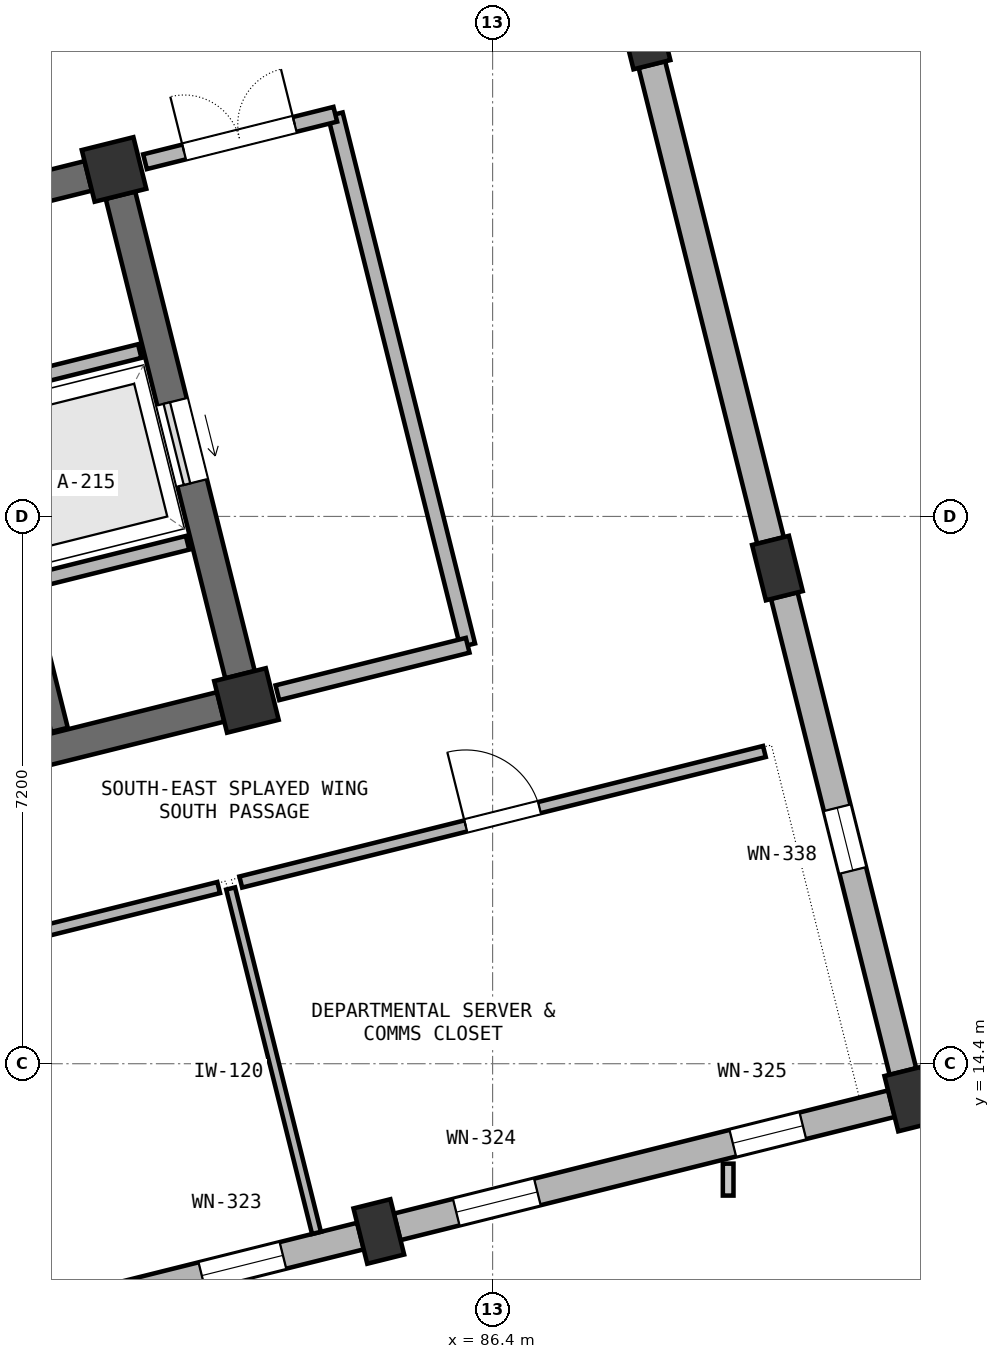
"""IFC4 building model, lengths in metres.
Left out: names, types, materials, properties, quantities, classifications, styles, units other than length and angle.
Written with IfcOpenShell. Run it as: python <this file> out.ifc"""

import sys

from ifc_helpers import new_model, si_unit, direction, frame, frame_2d, origin, origin_2d, place, context, subcontext, project, spatial, rectangle, extrude, element, fill, save


model = new_model("IFC4")
c1 = context("Model", 3, precision=1e-05, world=origin(), true_north=direction((0.0, 1.0)))
c2 = subcontext(c1, "Body", "Model", "MODEL_VIEW")
j1 = project(units=[si_unit("LENGTHUNIT", "METRE"), si_unit("PLANEANGLEUNIT", "RADIAN")], contexts=[c1])
p1 = place(None, origin())
s1 = spatial("IfcSite", under=j1, at=p1, CompositionType="ELEMENT")
p2 = place(p1, origin())
s2 = spatial("IfcBuilding", under=s1, at=p2, CompositionType="ELEMENT")
p3 = place(p2, frame((0.0, 0.0, 14.4)))
s3 = spatial("IfcBuildingStorey", under=s2, at=p3, CompositionType="ELEMENT", Elevation=14.4)
p4 = place(p3, frame((84.903, 12.193, 0.0), z_axis=(0.0, 0.0, 1.0), x_axis=(0.970295726276, 0.2419218956, 0.0)))
e1 = element("IfcColumn", 1, at=p4, inside=s3, PredefinedType="COLUMN", context=c2, shape_type="SweptSolid", body=[
    extrude(rectangle(XDim=0.5, YDim=0.75, at=origin_2d()), origin(), (0.0, 0.0, 1.0), 4.2),
])
for number, where, z_axis, x_axis in (
    (2, (83.161, 19.179, 0.0), (0.0, 0.0, 1.0), (0.97, 0.242, 0.0)),
    (3, (81.419, 26.165, 0.0), (0.0, 0.0, 1.0), (0.97, 0.242, 0.0)),
):
    element("IfcColumn", number, at=place(p3, frame(where, z_axis=z_axis, x_axis=x_axis)), inside=s3, PredefinedType="COLUMN", context=c2, shape_type="SweptSolid", body=[
        extrude(rectangle(XDim=0.7, YDim=0.7, at=origin_2d()), origin(), (0.0, 0.0, 1.0), 4.2),
    ])
for number, where, z_axis, x_axis in (
    (4, (91.889, 13.935, 0.0), (0.0, 0.0, 1.0), (0.97, 0.242, 0.0)),
    (5, (90.147, 20.921, 0.0), (0.0, 0.0, 1.0), (0.97, 0.242, 0.0)),
    (6, (88.405, 27.907, 0.0), (0.0, 0.0, 1.0), (0.97, 0.242, 0.0)),
):
    element("IfcColumn", number, at=place(p3, frame(where, z_axis=z_axis, x_axis=x_axis)), inside=s3, PredefinedType="COLUMN", context=c2, shape_type="SweptSolid", body=[
        extrude(rectangle(XDim=0.5, YDim=0.75, at=origin_2d()), origin(), (0.0, 0.0, 1.0), 4.2),
    ])
p5 = place(p3, frame((76.515, 17.522, 0.0), z_axis=(0.0, 0.0, 1.0), x_axis=(0.970294759049, 0.241925774902, 0.0)))
e7 = element("IfcWall", 7, at=p5, inside=s3, PredefinedType="SHEAR", context=c2, shape_type="SweptSolid", body=[
    extrude(rectangle(XDim=6.5, YDim=0.4, at=frame_2d((3.25, 0.0))), origin(), (0.0, 0.0, 1.0), 4.2),
])
p6 = place(p3, frame((83.076, 19.519, 0.0), z_axis=(0.0, 0.0, 1.0), x_axis=(-0.241925774902, 0.970294759049, 0.0)))
e8 = element("IfcWall", 8, at=p6, inside=s3, PredefinedType="SHEAR", context=c2, shape_type="SweptSolid", body=[
    extrude(rectangle(XDim=6.5, YDim=0.4, at=frame_2d((3.25, 0.0))), origin(), (0.0, 0.0, 1.0), 4.2),
])
p7 = place(p6, frame((2.6, 0.0, 0.0)))
e9 = element("IfcOpeningElement", 9, at=p7, cuts=e8, PredefinedType="OPENING", context=c2, shape_type="SweptSolid", body=[
    extrude(rectangle(XDim=1.1, YDim=2.2, at=frame_2d((0.55, 1.1))), frame((0.0, 0.21, 0.0), z_axis=(0.0, -1.0, 0.0), x_axis=(1.0, 0.0, 0.0)), (0.0, 0.0, 1.0), 0.42),
])
p8 = place(p3, frame((81.08, 26.081, 0.0), z_axis=(0.0, 0.0, 1.0), x_axis=(-0.970294759049, -0.241925774902, 0.0)))
e10 = element("IfcWall", 10, at=p8, inside=s3, PredefinedType="SHEAR", context=c2, shape_type="SweptSolid", body=[
    extrude(rectangle(XDim=6.5, YDim=0.4, at=frame_2d((3.25, 0.0))), origin(), (0.0, 0.0, 1.0), 4.2),
])
p9 = place(p8, frame((3.6, 0.0, 0.0)))
e11 = element("IfcOpeningElement", 11, at=p9, cuts=e10, PredefinedType="OPENING", context=c2, shape_type="SweptSolid", body=[
    extrude(rectangle(XDim=1.2, YDim=2.2, at=frame_2d((0.6, 1.1))), frame((0.0, 0.21, 0.0), z_axis=(0.0, -1.0, 0.0), x_axis=(1.0, 0.0, 0.0)), (0.0, 0.0, 1.0), 0.42),
])
p10 = place(p3, frame((80.701, 18.792, 0.0), z_axis=(0.0, 0.0, 1.0), x_axis=(-0.241898249226, 0.970301621673, 0.0)))
e12 = element("IfcWall", 12, at=p10, inside=s3, PredefinedType="SHEAR", context=c2, shape_type="SweptSolid", body=[
    extrude(rectangle(XDim=6.76, YDim=0.225, at=frame_2d((3.38, 0.0))), origin(), (0.0, 0.0, 1.0), 4.2),
])
for number, where, z_axis, x_axis in (
    (13, (80.349, 20.745, 0.0), (0.0, 0.0, 1.0), (0.97, 0.242, 0.0)),
    (14, (79.72, 23.268, 0.0), (0.0, 0.0, 1.0), (0.97, 0.242, 0.0)),
):
    element("IfcWall", number, at=place(p3, frame(where, z_axis=z_axis, x_axis=x_axis)), inside=s3, PredefinedType="PARTITIONING", context=c2, shape_type="SweptSolid", body=[
        extrude(rectangle(XDim=2.1, YDim=0.185, at=frame_2d((1.05, 0.0))), origin(), (0.0, 0.0, 1.0), 4.2),
    ])
p11 = place(p3, frame((78.157, 10.511, 0.0), z_axis=(0.0, 0.0, 1.0), x_axis=(0.970296540998, 0.241918627903, 0.0)))
e15 = element("IfcWall", 15, at=p11, inside=s3, PredefinedType="SOLIDWALL", context=c2, shape_type="SweptSolid", body=[
    extrude(rectangle(XDim=6.704, YDim=0.36, at=frame_2d((3.352, 0.0))), origin(), (0.0, 0.0, 1.0), 3.04),
])
p12 = place(p11, frame((0.802, 0.0, 0.7)))
e16 = element("IfcOpeningElement", 16, at=p12, cuts=e15, PredefinedType="OPENING", context=c2, shape_type="SweptSolid", body=[
    extrude(rectangle(XDim=0.95, YDim=2.15, at=frame_2d((0.475, 1.075))), frame((0.0, 0.19, 0.0), z_axis=(0.0, -1.0, 0.0), x_axis=(1.0, 0.0, 0.0)), (0.0, 0.0, 1.0), 0.38),
])
p13 = place(p11, frame((4.552, 0.0, 0.7)))
e17 = element("IfcOpeningElement", 17, at=p13, cuts=e15, PredefinedType="OPENING", context=c2, shape_type="SweptSolid", body=[
    extrude(rectangle(XDim=1.1, YDim=2.19, at=frame_2d((0.55, 1.095))), frame((0.0, 0.19, 0.0), z_axis=(0.0, -1.0, 0.0), x_axis=(1.0, 0.0, 0.0)), (0.0, 0.0, 1.0), 0.38),
])
p14 = place(p3, frame((85.144, 12.253, 0.0), z_axis=(0.0, 0.0, 1.0), x_axis=(0.970296540998, 0.241918627903, 0.0)))
e18 = element("IfcWall", 18, at=p14, inside=s3, PredefinedType="SOLIDWALL", context=c2, shape_type="SweptSolid", body=[
    extrude(rectangle(XDim=6.704, YDim=0.36, at=frame_2d((3.352, 0.0))), origin(), (0.0, 0.0, 1.0), 3.04),
])
p15 = place(p14, frame((0.802, 0.0, 0.7)))
e19 = element("IfcOpeningElement", 19, at=p15, cuts=e18, PredefinedType="OPENING", context=c2, shape_type="SweptSolid", body=[
    extrude(rectangle(XDim=1.1, YDim=2.19, at=frame_2d((0.55, 1.095))), frame((0.0, 0.19, 0.0), z_axis=(0.0, -1.0, 0.0), x_axis=(1.0, 0.0, 0.0)), (0.0, 0.0, 1.0), 0.38),
])
p16 = place(p14, frame((4.552, 0.0, 0.7)))
e20 = element("IfcOpeningElement", 20, at=p16, cuts=e18, PredefinedType="OPENING", context=c2, shape_type="SweptSolid", body=[
    extrude(rectangle(XDim=0.95, YDim=2.15, at=frame_2d((0.475, 1.075))), frame((0.0, 0.19, 0.0), z_axis=(0.0, -1.0, 0.0), x_axis=(1.0, 0.0, 0.0)), (0.0, 0.0, 1.0), 0.38),
])
p17 = place(p3, frame((91.799, 14.297, 0.0), z_axis=(0.0, 0.0, 1.0), x_axis=(-0.241912519272, 0.970298064009, 0.0)))
e21 = element("IfcWall", 21, at=p17, inside=s3, PredefinedType="SOLIDWALL", context=c2, shape_type="SweptSolid", body=[
    extrude(rectangle(XDim=6.454, YDim=0.36, at=frame_2d((3.227, 0.0))), origin(), (0.0, 0.0, 1.0), 3.04),
])
p18 = place(p17, frame((2.727, 0.0, 0.7)))
e22 = element("IfcOpeningElement", 22, at=p18, cuts=e21, PredefinedType="OPENING", context=c2, shape_type="SweptSolid", body=[
    extrude(rectangle(XDim=0.85, YDim=2.19, at=frame_2d((0.425, 1.095))), frame((0.0, 0.19, 0.0), z_axis=(0.0, -1.0, 0.0), x_axis=(1.0, 0.0, 0.0)), (0.0, 0.0, 1.0), 0.38),
])
p19 = place(p3, frame((90.057, 21.283, 0.0), z_axis=(0.0, 0.0, 1.0), x_axis=(-0.241912519272, 0.970298064009, 0.0)))
e23 = element("IfcWall", 23, at=p19, inside=s3, PredefinedType="SOLIDWALL", context=c2, shape_type="SweptSolid", body=[
    extrude(rectangle(XDim=6.454, YDim=0.36, at=frame_2d((3.227, 0.0))), origin(), (0.0, 0.0, 1.0), 3.04),
])
p20 = place(p3, frame((86.072, 19.905, 0.0), z_axis=(0.0, 0.0, 1.0), x_axis=(-0.241937193493, 0.970291911955, 0.0)))
e24 = element("IfcWall", 24, at=p20, inside=s3, PredefinedType="PARTITIONING", context=c2, shape_type="SweptSolid", body=[
    extrude(rectangle(XDim=7.2, YDim=0.2, at=frame_2d((3.6, 0.0))), origin(), (0.0, 0.0, 1.0), 3.08),
])
p21 = place(p3, frame((83.569, 19.281, 0.0), z_axis=(0.0, 0.0, 1.0), x_axis=(0.970287048366, 0.241956698135, 0.0)))
e25 = element("IfcWall", 25, at=p21, inside=s3, PredefinedType="PARTITIONING", context=c2, shape_type="SweptSolid", body=[
    extrude(rectangle(XDim=2.58, YDim=0.2, at=frame_2d((1.29, 0.0))), origin(), (0.0, 0.0, 1.0), 3.08),
])
p22 = place(p3, frame((84.33, 26.891, 0.0), z_axis=(0.0, 0.0, 1.0), x_axis=(-0.970309259708, -0.2418676095, 0.0)))
e26 = element("IfcWall", 26, at=p22, inside=s3, PredefinedType="PARTITIONING", context=c2, shape_type="SweptSolid", body=[
    extrude(rectangle(XDim=2.58, YDim=0.2, at=frame_2d((1.29, 0.0))), origin(), (0.0, 0.0, 1.0), 3.08),
])
p23 = place(p22, frame((0.55, 0.0, 0.0)))
e27 = element("IfcOpeningElement", 27, at=p23, cuts=e26, PredefinedType="OPENING", context=c2, shape_type="SweptSolid", body=[
    extrude(rectangle(XDim=1.5, YDim=2.2, at=frame_2d((0.75, 1.1))), frame((0.0, 0.11, 0.0), z_axis=(0.0, -1.0, 0.0), x_axis=(1.0, 0.0, 0.0)), (0.0, 0.0, 1.0), 0.22),
])
p24 = place(p3, frame((67.562, 12.919, 0.0), z_axis=(0.0, 0.0, 1.0), x_axis=(0.970296892124, 0.24191721959, 0.0)))
e28 = element("IfcWall", 28, at=p24, inside=s3, PredefinedType="PARTITIONING", context=c2, shape_type="SweptSolid", body=[
    extrude(rectangle(XDim=15.7, YDim=0.15, at=frame_2d((7.85, 0.0))), origin(), (0.0, 0.0, 1.0), 3.08),
])
p25 = place(p24, frame((7.35, 0.0, 0.0)))
e29 = element("IfcOpeningElement", 29, at=p25, cuts=e28, PredefinedType="OPENING", context=c2, shape_type="SweptSolid", body=[
    extrude(rectangle(XDim=1.0, YDim=2.2, at=frame_2d((0.5, 1.1))), frame((0.0, 0.085, 0.0), z_axis=(0.0, -1.0, 0.0), x_axis=(1.0, 0.0, 0.0)), (0.0, 0.0, 1.0), 0.17),
])
p26 = place(p3, frame((83.087, 16.79, 0.0), z_axis=(0.0, 0.0, 1.0), x_axis=(0.970289980954, 0.241944937661, 0.0)))
e30 = element("IfcWall", 30, at=p26, inside=s3, PredefinedType="PARTITIONING", context=c2, shape_type="SweptSolid", body=[
    extrude(rectangle(XDim=7.1, YDim=0.15, at=frame_2d((3.55, 0.0))), origin(), (0.0, 0.0, 1.0), 3.08),
])
p27 = place(p26, frame((3.05, 0.0, 0.0)))
e31 = element("IfcOpeningElement", 31, at=p27, cuts=e30, PredefinedType="OPENING", context=c2, shape_type="SweptSolid", body=[
    extrude(rectangle(XDim=1.0, YDim=2.2, at=frame_2d((0.5, 1.1))), frame((0.0, 0.085, 0.0), z_axis=(0.0, -1.0, 0.0), x_axis=(1.0, 0.0, 0.0)), (0.0, 0.0, 1.0), 0.17),
])
p28 = place(p3, frame((84.083, 12.174, 0.0), z_axis=(0.0, 0.0, 1.0), x_axis=(-0.241895920765, 0.97030220216, 0.0)))
e32 = element("IfcWall", 32, at=p28, inside=s3, PredefinedType="PARTITIONING", context=c2, shape_type="SweptSolid", body=[
    extrude(rectangle(XDim=4.67, YDim=0.12, at=frame_2d((2.335, 0.0))), origin(), (0.0, 0.0, 1.0), 3.08),
])
p29 = place(p3, frame((74.508, 27.225, 0.0), z_axis=(0.0, 0.0, 1.0), x_axis=(0.970298350757, 0.241911369139, 0.0)))
e33 = element("IfcWall", 33, at=p29, inside=s3, PredefinedType="PARTITIONING", context=c2, shape_type="SweptSolid", body=[
    extrude(rectangle(XDim=12.7, YDim=0.15, at=frame_2d((6.35, 0.0))), origin(), (0.0, 0.0, 1.0), 3.08),
])
p30 = place(p29, frame((2.35, 0.0, 0.0)))
e34 = element("IfcOpeningElement", 34, at=p30, cuts=e33, PredefinedType="OPENING", context=c2, shape_type="SweptSolid", body=[
    extrude(rectangle(XDim=1.0, YDim=2.15, at=frame_2d((0.5, 1.075))), frame((0.0, 0.085, 0.0), z_axis=(0.0, -1.0, 0.0), x_axis=(1.0, 0.0, 0.0)), (0.0, 0.0, 1.0), 0.17),
])
p31 = place(p7, origin())
e35 = element("IfcDoor", 35, at=p31, inside=s3, OperationType="SLIDING_TO_LEFT", PredefinedType="DOOR", context=c2, shape_type="SweptSolid", body=[
    extrude(rectangle(XDim=1.1, YDim=2.2, at=frame_2d((0.55, 1.1))), frame((0.0, 0.025, 0.0), z_axis=(0.0, -1.0, 0.0), x_axis=(1.0, 0.0, 0.0)), (0.0, 0.0, 1.0), 0.05),
])
fill(e9, e35)
p32 = place(p13, origin())
e36 = element("IfcWindow", 36, at=p32, inside=s3, PartitioningType="SINGLE_PANEL", PredefinedType="WINDOW", context=c2, shape_type="SweptSolid", body=[
    extrude(rectangle(XDim=1.1, YDim=2.19, at=frame_2d((0.55, 1.095))), frame((0.0, 0.03, 0.0), z_axis=(0.0, -1.0, 0.0), x_axis=(1.0, 0.0, 0.0)), (0.0, 0.0, 1.0), 0.06),
])
fill(e17, e36)
p33 = place(p15, origin())
e37 = element("IfcWindow", 37, at=p33, inside=s3, PartitioningType="SINGLE_PANEL", PredefinedType="WINDOW", context=c2, shape_type="SweptSolid", body=[
    extrude(rectangle(XDim=1.1, YDim=2.19, at=frame_2d((0.55, 1.095))), frame((0.0, 0.03, 0.0), z_axis=(0.0, -1.0, 0.0), x_axis=(1.0, 0.0, 0.0)), (0.0, 0.0, 1.0), 0.06),
])
fill(e19, e37)
p34 = place(p16, origin())
e38 = element("IfcWindow", 38, at=p34, inside=s3, PartitioningType="SINGLE_PANEL", PredefinedType="WINDOW", context=c2, shape_type="SweptSolid", body=[
    extrude(rectangle(XDim=0.95, YDim=2.15, at=frame_2d((0.475, 1.075))), frame((0.0, 0.03, 0.0), z_axis=(0.0, -1.0, 0.0), x_axis=(1.0, 0.0, 0.0)), (0.0, 0.0, 1.0), 0.06),
])
fill(e20, e38)
p35 = place(p18, origin())
e39 = element("IfcWindow", 39, at=p35, inside=s3, PartitioningType="SINGLE_PANEL", PredefinedType="WINDOW", context=c2, shape_type="SweptSolid", body=[
    extrude(rectangle(XDim=0.85, YDim=2.19, at=frame_2d((0.425, 1.095))), frame((0.0, 0.03, 0.0), z_axis=(0.0, -1.0, 0.0), x_axis=(1.0, 0.0, 0.0)), (0.0, 0.0, 1.0), 0.06),
])
fill(e22, e39)
p36 = place(p23, frame((1.5, 0.0, 0.0), z_axis=(0.0, 0.0, 1.0), x_axis=(-1.0, 0.0, 0.0)))
e40 = element("IfcDoor", 40, at=p36, inside=s3, OperationType="DOUBLE_DOOR_SINGLE_SWING", PredefinedType="DOOR", context=c2, shape_type="SweptSolid", body=[
    extrude(rectangle(XDim=1.5, YDim=2.2, at=frame_2d((0.75, 1.1))), frame((0.0, 0.025, 0.0), z_axis=(0.0, -1.0, 0.0), x_axis=(1.0, 0.0, 0.0)), (0.0, 0.0, 1.0), 0.05),
])
fill(e27, e40)
p37 = place(p27, origin())
e41 = element("IfcDoor", 41, at=p37, inside=s3, OperationType="SINGLE_SWING_LEFT", PredefinedType="DOOR", context=c2, shape_type="SweptSolid", body=[
    extrude(rectangle(XDim=1.0, YDim=2.2, at=frame_2d((0.5, 1.1))), frame((0.0, 0.025, 0.0), z_axis=(0.0, -1.0, 0.0), x_axis=(1.0, 0.0, 0.0)), (0.0, 0.0, 1.0), 0.05),
])
fill(e31, e41)
save(model, sys.argv[1])
